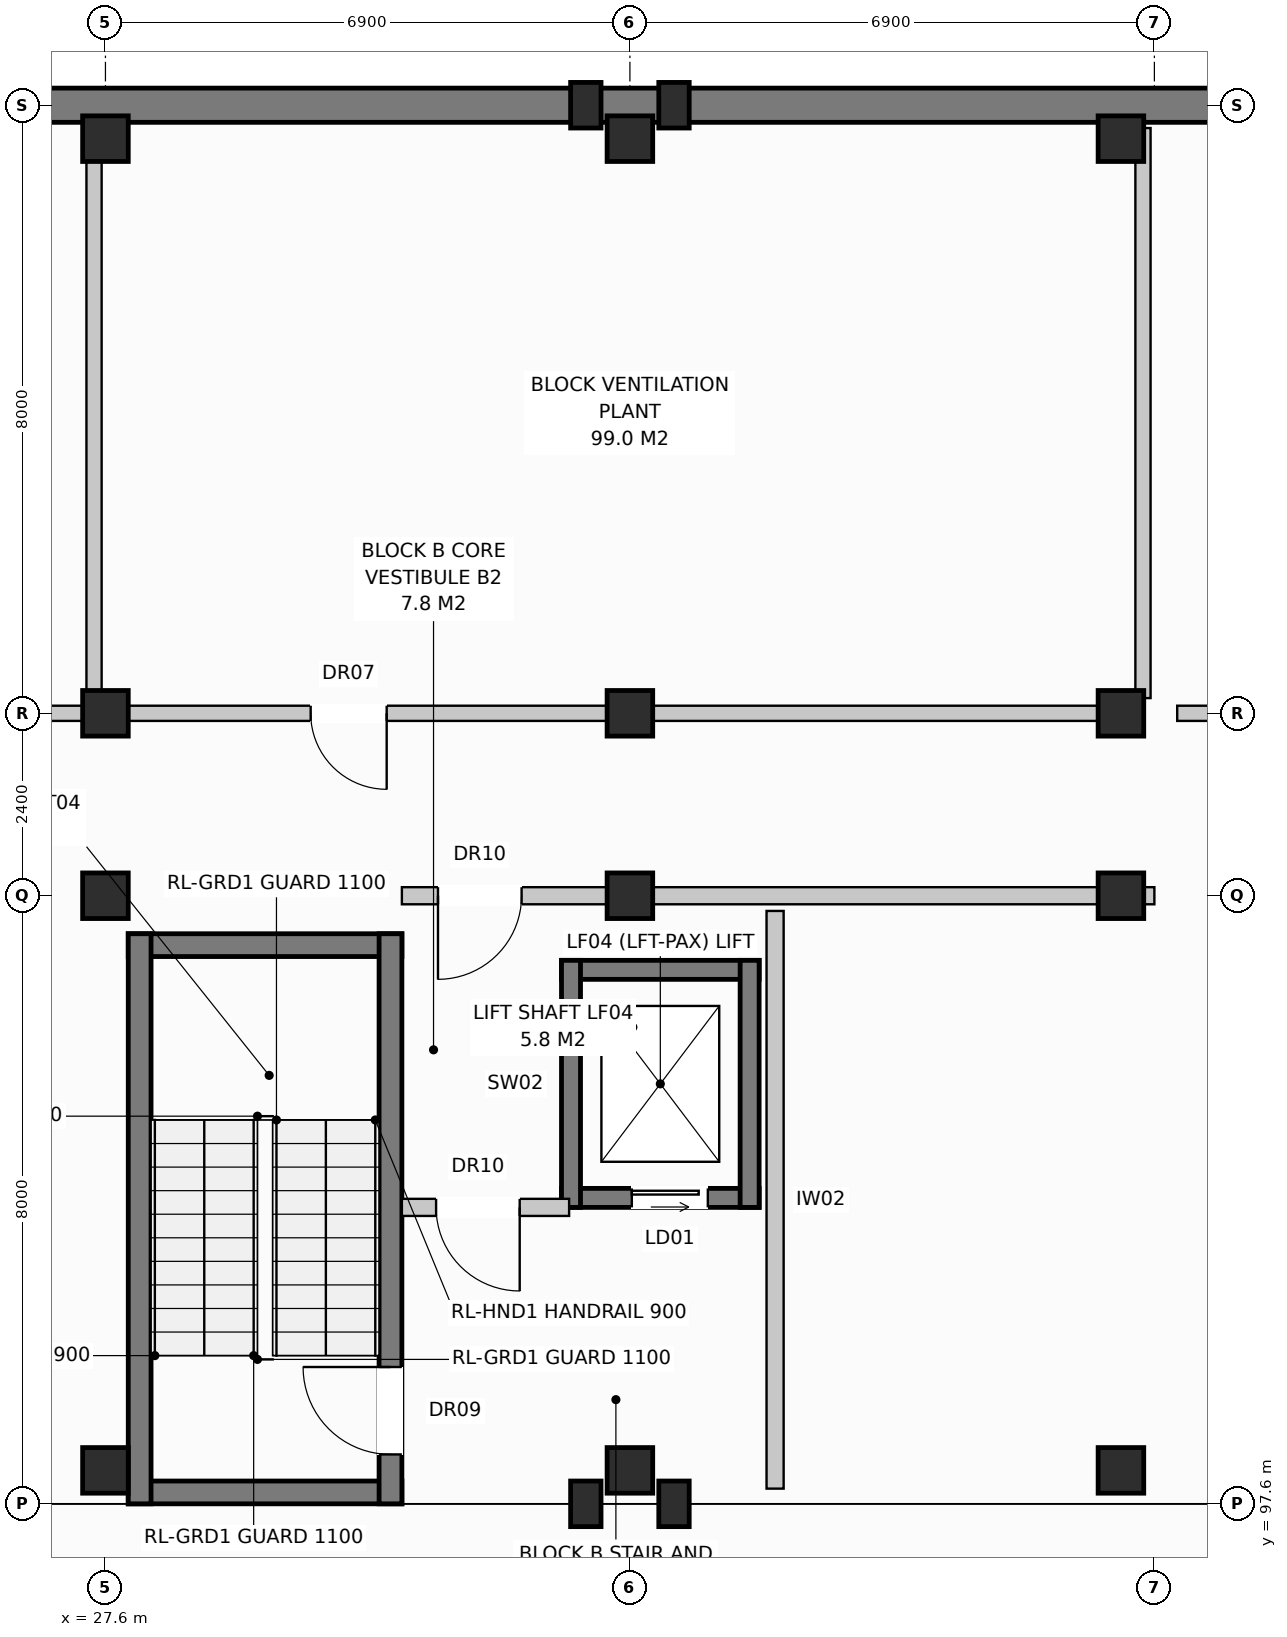
"""IFC4 building model, lengths in metres.
Left out: names, types, materials, properties, quantities, classifications, styles, units other than length and angle.
Written with IfcOpenShell. Run it as: python <this file> out.ifc"""

import sys

from ifc_helpers import new_model, si_unit, direction, frame, frame_2d, origin, origin_with_axes, origin_2d, place, context, subcontext, project, spatial, rectangle, extrude, element, fill, save


model = new_model("IFC4")
c1 = context("Model", 3, precision=1e-05, world=origin(), true_north=direction((0.0, 1.0)))
c2 = subcontext(c1, "Body", "Model", "MODEL_VIEW")
j1 = project(units=[si_unit("LENGTHUNIT", "METRE"), si_unit("PLANEANGLEUNIT", "RADIAN")], contexts=[c1])
p1 = place(None, origin())
s1 = spatial("IfcSite", under=j1, at=p1, CompositionType="ELEMENT")
p2 = place(p1, origin())
s2 = spatial("IfcBuilding", under=s1, at=p2, CompositionType="ELEMENT")
p3 = place(p2, frame((0.0, 0.0, -3.8)))
s3 = spatial("IfcBuildingStorey", under=s2, at=p3, CompositionType="ELEMENT", Elevation=-3.8)
for number, where, z_axis, x_axis in (
    (1, (27.6, 98.04, 0.0), (0.0, 0.0, 1.0), (1.0, 0.0, 0.0)),
    (2, (27.6, 105.6, 0.0), (0.0, 0.0, 1.0), (1.0, 0.0, 0.0)),
    (3, (27.6, 108.0, 0.0), (0.0, 0.0, 1.0), (1.0, 0.0, 0.0)),
    (4, (27.6, 115.56, 0.0), (0.0, 0.0, 1.0), (1.0, 0.0, 0.0)),
    (5, (34.5, 98.04, 0.0), (0.0, 0.0, 1.0), (1.0, 0.0, 0.0)),
    (6, (34.5, 105.6, 0.0), (0.0, 0.0, 1.0), (1.0, 0.0, 0.0)),
    (7, (34.5, 108.0, 0.0), (0.0, 0.0, 1.0), (1.0, 0.0, 0.0)),
    (8, (34.5, 115.56, 0.0), (0.0, 0.0, 1.0), (1.0, 0.0, 0.0)),
    (9, (40.96, 98.04, 0.0), (0.0, 0.0, 1.0), (1.0, 0.0, 0.0)),
    (10, (40.96, 105.6, 0.0), (0.0, 0.0, 1.0), (1.0, 0.0, 0.0)),
    (11, (40.96, 108.0, 0.0), (0.0, 0.0, 1.0), (1.0, 0.0, 0.0)),
    (12, (40.96, 115.56, 0.0), (0.0, 0.0, 1.0), (1.0, 0.0, 0.0)),
):
    element("IfcColumn", number, at=place(p3, frame(where, z_axis=z_axis, x_axis=x_axis)), inside=s3, PredefinedType="COLUMN", context=c2, shape_type="SweptSolid", body=[
        extrude(rectangle(XDim=0.6, YDim=0.6, at=origin_2d()), origin(), (0.0, 0.0, 1.0), 3.8),
    ])
for number, where, z_axis, x_axis in (
    (13, (33.92, 116.0, 0.0), (0.0, 0.0, 1.0), (1.0, 0.0, 0.0)),
    (14, (33.92, 97.6, 0.0), (0.0, 0.0, 1.0), (1.0, 0.0, 0.0)),
    (15, (35.08, 116.0, 0.0), (0.0, 0.0, 1.0), (1.0, 0.0, 0.0)),
    (16, (35.08, 97.6, 0.0), (0.0, 0.0, 1.0), (1.0, 0.0, 0.0)),
):
    element("IfcColumn", number, at=place(p3, frame(where, z_axis=z_axis, x_axis=x_axis)), inside=s3, PredefinedType="PILASTER", context=c2, shape_type="SweptSolid", body=[
        extrude(rectangle(XDim=0.4, YDim=0.6, at=origin_2d()), origin(), (0.0, 0.0, 1.0), 3.8),
    ])
p4 = place(p3, frame((168.0, 116.0, 0.0), z_axis=(0.0, 0.0, 1.0), x_axis=(-1.0, 0.0, 0.0)))
e17 = element("IfcWall", 17, at=p4, inside=s3, PredefinedType="STANDARD", context=c2, shape_type="SweptSolid", body=[
    extrude(rectangle(XDim=168.0, YDim=0.45, at=frame_2d((84.0, 0.0))), origin(), (0.0, 0.0, 1.0), 3.48),
])
for number, where, z_axis, x_axis in (
    (18, (27.9, 97.75, 0.0), (0.0, 0.0, 1.0), (1.0, 0.0, 0.0)),
    (19, (27.9, 104.95, 0.0), (0.0, 0.0, 1.0), (1.0, 0.0, 0.0)),
):
    element("IfcWall", number, at=place(p3, frame(where, z_axis=z_axis, x_axis=x_axis)), inside=s3, PredefinedType="SHEAR", context=c2, shape_type="SweptSolid", body=[
        extrude(rectangle(XDim=3.6, YDim=0.3, at=frame_2d((1.8, 0.0))), origin(), (0.0, 0.0, 1.0), 3.48),
    ])
p5 = place(p3, frame((28.05, 97.6, 0.0), z_axis=(0.0, 0.0, 1.0), x_axis=(0.0, 1.0, 0.0)))
e20 = element("IfcWall", 20, at=p5, inside=s3, PredefinedType="SHEAR", context=c2, shape_type="SweptSolid", body=[
    extrude(rectangle(XDim=7.5, YDim=0.3, at=frame_2d((3.75, 0.0))), origin(), (0.0, 0.0, 1.0), 3.48),
])
p6 = place(p3, frame((31.35, 97.6, 0.0), z_axis=(0.0, 0.0, 1.0), x_axis=(0.0, 1.0, 0.0)))
e21 = element("IfcWall", 21, at=p6, inside=s3, PredefinedType="SHEAR", context=c2, shape_type="SweptSolid", body=[
    extrude(rectangle(XDim=7.5, YDim=0.3, at=frame_2d((3.75, 0.0))), origin(), (0.0, 0.0, 1.0), 3.48),
])
p7 = place(p6, frame((0.65, 0.0, 0.0)))
e22 = element("IfcOpeningElement", 22, at=p7, cuts=e21, PredefinedType="OPENING", context=c2, shape_type="SweptSolid", body=[
    extrude(rectangle(XDim=1.15, YDim=2.15, at=frame_2d((0.575, 1.075))), frame((0.0, 0.162, 0.0), z_axis=(0.0, -1.0, 0.0), x_axis=(1.0, 0.0, 0.0)), (0.0, 0.0, 1.0), 0.324),
])
p8 = place(p3, frame((33.6, 101.625, 0.0), z_axis=(0.0, 0.0, 1.0), x_axis=(1.0, 0.0, 0.0)))
e23 = element("IfcWall", 23, at=p8, inside=s3, PredefinedType="SHEAR", context=c2, shape_type="SweptSolid", body=[
    extrude(rectangle(XDim=2.6, YDim=0.25, at=frame_2d((1.3, 0.0))), origin(), (0.0, 0.0, 1.0), 3.48),
])
p9 = place(p8, frame((0.925, 0.0, 0.0)))
e24 = element("IfcOpeningElement", 24, at=p9, cuts=e23, PredefinedType="OPENING", context=c2, shape_type="SweptSolid", body=[
    extrude(rectangle(XDim=1.0, YDim=2.1, at=frame_2d((0.5, 1.05))), frame((0.0, 0.137, 0.0), z_axis=(0.0, -1.0, 0.0), x_axis=(1.0, 0.0, 0.0)), (0.0, 0.0, 1.0), 0.274),
])
p10 = place(p3, frame((33.6, 104.625, 0.0), z_axis=(0.0, 0.0, 1.0), x_axis=(1.0, 0.0, 0.0)))
e25 = element("IfcWall", 25, at=p10, inside=s3, PredefinedType="SHEAR", context=c2, shape_type="SweptSolid", body=[
    extrude(rectangle(XDim=2.6, YDim=0.25, at=frame_2d((1.3, 0.0))), origin(), (0.0, 0.0, 1.0), 3.48),
])
for number, where, z_axis, x_axis in (
    (26, (33.725, 101.5, 0.0), (0.0, 0.0, 1.0), (0.0, 1.0, 0.0)),
    (27, (36.075, 101.5, 0.0), (0.0, 0.0, 1.0), (0.0, 1.0, 0.0)),
):
    element("IfcWall", number, at=place(p3, frame(where, z_axis=z_axis, x_axis=x_axis)), inside=s3, PredefinedType="SHEAR", context=c2, shape_type="SweptSolid", body=[
        extrude(rectangle(XDim=3.25, YDim=0.25, at=frame_2d((1.625, 0.0))), origin(), (0.0, 0.0, 1.0), 3.48),
    ])
p11 = place(p3, frame((36.41, 97.8, 0.0), z_axis=(0.0, 0.0, 1.0), x_axis=(0.0, 1.0, 0.0)))
e28 = element("IfcWall", 28, at=p11, inside=s3, PredefinedType="PARTITIONING", context=c2, shape_type="SweptSolid", body=[
    extrude(rectangle(XDim=7.6, YDim=0.225, at=frame_2d((3.8, 0.0))), origin(), (0.0, 0.0, 1.0), 3.19),
])
p12 = place(p3, frame((31.5, 101.5, 0.0), z_axis=(0.0, 0.0, 1.0), x_axis=(1.0, 0.0, 0.0)))
e29 = element("IfcWall", 29, at=p12, inside=s3, PredefinedType="PARTITIONING", context=c2, shape_type="SweptSolid", body=[
    extrude(rectangle(XDim=2.2, YDim=0.225, at=frame_2d((1.1, 0.0))), origin(), (0.0, 0.0, 1.0), 3.48),
])
p13 = place(p12, frame((0.45, 0.0, 0.0)))
e30 = element("IfcOpeningElement", 30, at=p13, cuts=e29, PredefinedType="OPENING", context=c2, shape_type="SweptSolid", body=[
    extrude(rectangle(XDim=1.1, YDim=2.15, at=frame_2d((0.55, 1.075))), frame((0.0, 0.125, 0.0), z_axis=(0.0, -1.0, 0.0), x_axis=(1.0, 0.0, 0.0)), (0.0, 0.0, 1.0), 0.249),
])
p14 = place(p3, frame((27.6, 105.6, 0.0), z_axis=(0.0, 0.0, 1.0), x_axis=(1.0, 0.0, 0.0)))
e31 = element("IfcWall", 31, at=p14, inside=s3, PredefinedType="PARTITIONING", context=c2, shape_type="SweptSolid", body=[
    extrude(rectangle(XDim=0.3, YDim=0.225, at=frame_2d((0.15, 0.0))), origin(), (0.0, 0.0, 1.0), 3.48),
])
p15 = place(p3, frame((31.5, 105.6, 0.0), z_axis=(0.0, 0.0, 1.0), x_axis=(1.0, 0.0, 0.0)))
e32 = element("IfcWall", 32, at=p15, inside=s3, PredefinedType="PARTITIONING", context=c2, shape_type="SweptSolid", body=[
    extrude(rectangle(XDim=9.9, YDim=0.225, at=frame_2d((4.95, 0.0))), origin(), (0.0, 0.0, 1.0), 2.92),
])
p16 = place(p15, frame((0.475, 0.0, 0.0)))
e33 = element("IfcOpeningElement", 33, at=p16, cuts=e32, PredefinedType="OPENING", context=c2, shape_type="SweptSolid", body=[
    extrude(rectangle(XDim=1.1, YDim=2.15, at=frame_2d((0.55, 1.075))), frame((0.0, 0.125, 0.0), z_axis=(0.0, -1.0, 0.0), x_axis=(1.0, 0.0, 0.0)), (0.0, 0.0, 1.0), 0.249),
])
p17 = place(p3, frame((14.1, 108.0, 0.0), z_axis=(0.0, 0.0, 1.0), x_axis=(1.0, 0.0, 0.0)))
e34 = element("IfcWall", 34, at=p17, inside=s3, PredefinedType="PARTITIONING", context=c2, shape_type="SweptSolid", body=[
    extrude(rectangle(XDim=13.2, YDim=0.2, at=frame_2d((6.6, 0.0))), origin(), (0.0, 0.0, 1.0), 2.92),
])
p18 = place(p17, frame((2.4, 0.0, 0.0)))
e35 = element("IfcOpeningElement", 35, at=p18, cuts=e34, PredefinedType="OPENING", context=c2, shape_type="SweptSolid", body=[
    extrude(rectangle(XDim=1.0, YDim=2.15, at=frame_2d((0.5, 1.075))), frame((0.0, 0.112, 0.0), z_axis=(0.0, -1.0, 0.0), x_axis=(1.0, 0.0, 0.0)), (0.0, 0.0, 1.0), 0.224),
])
p19 = place(p3, frame((27.45, 108.2, 0.0), z_axis=(0.0, 0.0, 1.0), x_axis=(0.0, 1.0, 0.0)))
e36 = element("IfcWall", 36, at=p19, inside=s3, PredefinedType="PARTITIONING", context=c2, shape_type="SweptSolid", body=[
    extrude(rectangle(XDim=7.5, YDim=0.2, at=frame_2d((3.75, 0.0))), origin(), (0.0, 0.0, 1.0), 3.48),
])
p20 = place(p3, frame((27.9, 108.0, 0.0), z_axis=(0.0, 0.0, 1.0), x_axis=(1.0, 0.0, 0.0)))
e37 = element("IfcWall", 37, at=p20, inside=s3, PredefinedType="PARTITIONING", context=c2, shape_type="SweptSolid", body=[
    extrude(rectangle(XDim=13.2, YDim=0.2, at=frame_2d((6.6, 0.0))), origin(), (0.0, 0.0, 1.0), 2.92),
])
p21 = place(p20, frame((2.4, 0.0, 0.0)))
e38 = element("IfcOpeningElement", 38, at=p21, cuts=e37, PredefinedType="OPENING", context=c2, shape_type="SweptSolid", body=[
    extrude(rectangle(XDim=1.0, YDim=2.15, at=frame_2d((0.5, 1.075))), frame((0.0, 0.112, 0.0), z_axis=(0.0, -1.0, 0.0), x_axis=(1.0, 0.0, 0.0)), (0.0, 0.0, 1.0), 0.224),
])
p22 = place(p3, frame((41.25, 108.2, 0.0), z_axis=(0.0, 0.0, 1.0), x_axis=(0.0, 1.0, 0.0)))
e39 = element("IfcWall", 39, at=p22, inside=s3, PredefinedType="PARTITIONING", context=c2, shape_type="SweptSolid", body=[
    extrude(rectangle(XDim=7.5, YDim=0.2, at=frame_2d((3.75, 0.0))), origin(), (0.0, 0.0, 1.0), 3.48),
])
p23 = place(p3, frame((41.7, 108.0, 0.0), z_axis=(0.0, 0.0, 1.0), x_axis=(1.0, 0.0, 0.0)))
e40 = element("IfcWall", 40, at=p23, inside=s3, PredefinedType="PARTITIONING", context=c2, shape_type="SweptSolid", body=[
    extrude(rectangle(XDim=13.2, YDim=0.2, at=frame_2d((6.6, 0.0))), origin(), (0.0, 0.0, 1.0), 2.92),
])
p24 = place(p23, frame((2.4, 0.0, 0.0)))
e41 = element("IfcOpeningElement", 41, at=p24, cuts=e40, PredefinedType="OPENING", context=c2, shape_type="SweptSolid", body=[
    extrude(rectangle(XDim=1.0, YDim=2.15, at=frame_2d((0.5, 1.075))), frame((0.0, 0.112, 0.0), z_axis=(0.0, -1.0, 0.0), x_axis=(1.0, 0.0, 0.0)), (0.0, 0.0, 1.0), 0.224),
])
p25 = place(p7, origin_with_axes())
e42 = element("IfcDoor", 42, at=p25, inside=s3, OperationType="SINGLE_SWING_RIGHT", PredefinedType="DOOR", context=c2, shape_type="SweptSolid", body=[
    extrude(rectangle(XDim=1.15, YDim=2.15, at=frame_2d((0.575, 1.075))), frame((0.0, 0.025, 0.0), z_axis=(0.0, -1.0, 0.0), x_axis=(1.0, 0.0, 0.0)), (0.0, 0.0, 1.0), 0.05),
])
fill(e22, e42)
p26 = place(p9, origin_with_axes())
e43 = element("IfcDoor", 43, at=p26, inside=s3, OperationType="SLIDING_TO_LEFT", PredefinedType="DOOR", context=c2, shape_type="SweptSolid", body=[
    extrude(rectangle(XDim=1.0, YDim=2.1, at=frame_2d((0.5, 1.05))), frame((0.0, 0.025, 0.0), z_axis=(0.0, -1.0, 0.0), x_axis=(1.0, 0.0, 0.0)), (0.0, 0.0, 1.0), 0.05),
])
fill(e24, e43)
p27 = place(p13, frame((1.1, 0.0, 0.0), z_axis=(0.0, 0.0, 1.0), x_axis=(-1.0, 0.0, 0.0)))
e44 = element("IfcDoor", 44, at=p27, inside=s3, OperationType="SINGLE_SWING_RIGHT", PredefinedType="DOOR", context=c2, shape_type="SweptSolid", body=[
    extrude(rectangle(XDim=1.1, YDim=2.15, at=frame_2d((0.55, 1.075))), frame((0.0, 0.025, 0.0), z_axis=(0.0, -1.0, 0.0), x_axis=(1.0, 0.0, 0.0)), (0.0, 0.0, 1.0), 0.05),
])
fill(e30, e44)
p28 = place(p16, frame((1.1, 0.0, 0.0), z_axis=(0.0, 0.0, 1.0), x_axis=(-1.0, 0.0, 0.0)))
e45 = element("IfcDoor", 45, at=p28, inside=s3, OperationType="SINGLE_SWING_LEFT", PredefinedType="DOOR", context=c2, shape_type="SweptSolid", body=[
    extrude(rectangle(XDim=1.1, YDim=2.15, at=frame_2d((0.55, 1.075))), frame((0.0, 0.025, 0.0), z_axis=(0.0, -1.0, 0.0), x_axis=(1.0, 0.0, 0.0)), (0.0, 0.0, 1.0), 0.05),
])
fill(e33, e45)
p29 = place(p21, frame((1.0, 0.0, 0.0), z_axis=(0.0, 0.0, 1.0), x_axis=(-1.0, 0.0, 0.0)))
e46 = element("IfcDoor", 46, at=p29, inside=s3, OperationType="SINGLE_SWING_RIGHT", PredefinedType="DOOR", context=c2, shape_type="SweptSolid", body=[
    extrude(rectangle(XDim=1.0, YDim=2.15, at=frame_2d((0.5, 1.075))), frame((0.0, 0.025, 0.0), z_axis=(0.0, -1.0, 0.0), x_axis=(1.0, 0.0, 0.0)), (0.0, 0.0, 1.0), 0.05),
])
fill(e38, e46)
save(model, sys.argv[1])
